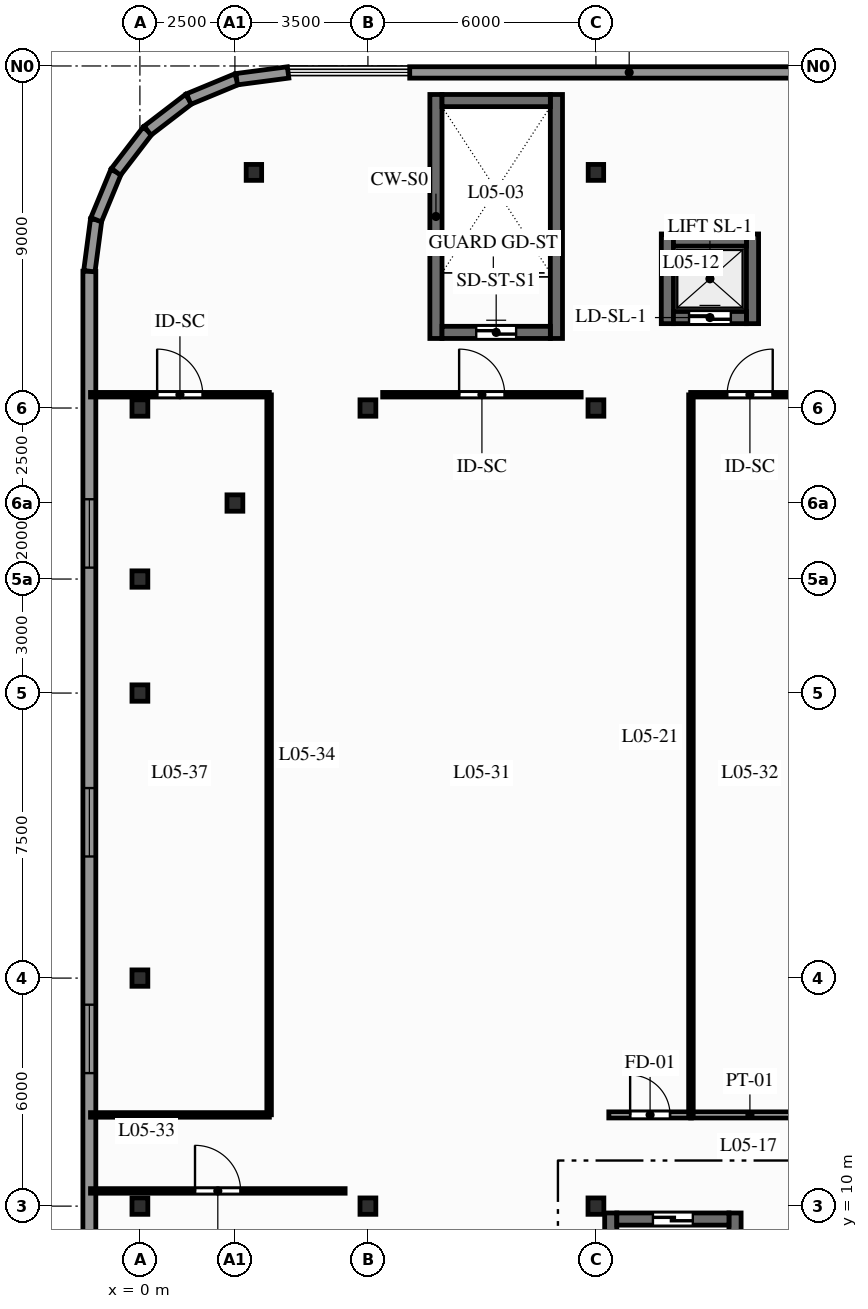
"""IFC4 building model, lengths in metres.
Left out: names, types, materials, properties, quantities, classifications, styles, units other than length and angle.
Written with IfcOpenShell. Run it as: python <this file> out.ifc"""

import sys

from ifc_helpers import new_model, si_unit, direction, frame, frame_2d, origin, origin_2d, place, context, subcontext, project, spatial, rectangle, i_section, extrude, element, fill, save


model = new_model("IFC4")
c1 = context("Model", 3, precision=1e-05, world=origin(), true_north=direction((0.0, 1.0)))
c2 = subcontext(c1, "Body", "Model", "MODEL_VIEW")
j1 = project(units=[si_unit("LENGTHUNIT", "METRE"), si_unit("PLANEANGLEUNIT", "RADIAN")], contexts=[c1])
p1 = place(None, origin())
s1 = spatial("IfcSite", under=j1, at=p1, CompositionType="ELEMENT")
p2 = place(p1, origin())
s2 = spatial("IfcBuilding", under=s1, at=p2, CompositionType="ELEMENT")
p3 = place(p2, frame((0.0, 0.0, 22.5)))
s3 = spatial("IfcBuildingStorey", under=s2, at=p3, CompositionType="ELEMENT", Elevation=22.5)
for number, where, z_axis, x_axis in (
    (1, (0.0, 10.0, 0.0), (0.0, 0.0, 1.0), (1.0, 0.0, 0.0)),
    (2, (0.0, 16.0, 0.0), (0.0, 0.0, 1.0), (1.0, 0.0, 0.0)),
    (3, (0.0, 23.5, 0.0), (0.0, 0.0, 1.0), (1.0, 0.0, 0.0)),
    (4, (0.0, 26.5, 0.0), (0.0, 0.0, 1.0), (1.0, 0.0, 0.0)),
    (5, (0.0, 31.0, 0.0), (0.0, 0.0, 1.0), (1.0, 0.0, 0.0)),
    (6, (2.5, 28.5, 0.0), (0.0, 0.0, 1.0), (1.0, 0.0, 0.0)),
):
    element("IfcColumn", number, at=place(p3, frame(where, z_axis=z_axis, x_axis=x_axis)), inside=s3, PredefinedType="COLUMN", context=c2, shape_type="SweptSolid", body=[
        extrude(i_section(OverallWidth=0.417, OverallDepth=0.431, WebThickness=0.065, FlangeThickness=0.106, FilletRadius=0.015, at=origin_2d()), origin(), (0.0, 0.0, 1.0), 5.5),
    ])
p4 = place(p3, frame((3.0, 37.2, 0.0), z_axis=(0.0, 0.0, 1.0), x_axis=(1.0, 0.0, 0.0)))
e7 = element("IfcColumn", 7, at=p4, inside=s3, PredefinedType="COLUMN", context=c2, shape_type="SweptSolid", body=[
    extrude(i_section(OverallWidth=0.407, OverallDepth=0.419, WebThickness=0.031, FlangeThickness=0.049, FilletRadius=0.015, at=origin_2d()), origin(), (0.0, 0.0, 1.0), 5.5),
])
for number, where, z_axis, x_axis in (
    (8, (6.0, 10.0, 0.0), (0.0, 0.0, 1.0), (1.0, 0.0, 0.0)),
    (9, (6.0, 31.0, 0.0), (0.0, 0.0, 1.0), (1.0, 0.0, 0.0)),
    (10, (12.0, 10.0, 0.0), (0.0, 0.0, 1.0), (1.0, 0.0, 0.0)),
    (11, (12.0, 31.0, 0.0), (0.0, 0.0, 1.0), (1.0, 0.0, 0.0)),
):
    element("IfcColumn", number, at=place(p3, frame(where, z_axis=z_axis, x_axis=x_axis)), inside=s3, PredefinedType="COLUMN", context=c2, shape_type="SweptSolid", body=[
        extrude(i_section(OverallWidth=0.417, OverallDepth=0.431, WebThickness=0.065, FlangeThickness=0.106, FilletRadius=0.015, at=origin_2d()), origin(), (0.0, 0.0, 1.0), 5.5),
    ])
p5 = place(p3, frame((12.0, 37.2, 0.0), z_axis=(0.0, 0.0, 1.0), x_axis=(1.0, 0.0, 0.0)))
e12 = element("IfcColumn", 12, at=p5, inside=s3, PredefinedType="COLUMN", context=c2, shape_type="SweptSolid", body=[
    extrude(i_section(OverallWidth=0.407, OverallDepth=0.419, WebThickness=0.031, FlangeThickness=0.049, FilletRadius=0.015, at=origin_2d()), origin(), (0.0, 0.0, 1.0), 5.5),
])
p6 = place(p3, frame((-1.33, 34.6, 0.0), z_axis=(0.0, 0.0, 1.0), x_axis=(0.0, -1.0, 0.0)))
e13 = element("IfcWall", 13, at=p6, inside=s3, PredefinedType="STANDARD", context=c2, shape_type="SweptSolid", body=[
    extrude(rectangle(XDim=36.43, YDim=0.34, at=frame_2d((18.215, 0.0))), origin(), (0.0, 0.0, 1.0), 5.23),
])
p7 = place(p6, frame((28.3, 0.0, 0.9)))
e14 = element("IfcOpeningElement", 14, at=p7, cuts=e13, PredefinedType="OPENING", context=c2, shape_type="SweptSolid", body=[
    extrude(rectangle(XDim=1.8, YDim=1.95, at=frame_2d((0.9, 0.975))), frame((0.0, 0.18, 0.0), z_axis=(0.0, -1.0, 0.0), x_axis=(1.0, 0.0, 0.0)), (0.0, 0.0, 1.0), 0.36),
])
p8 = place(p6, frame((19.3, 0.0, 0.9)))
e15 = element("IfcOpeningElement", 15, at=p8, cuts=e13, PredefinedType="OPENING", context=c2, shape_type="SweptSolid", body=[
    extrude(rectangle(XDim=1.8, YDim=1.95, at=frame_2d((0.9, 0.975))), frame((0.0, 0.18, 0.0), z_axis=(0.0, -1.0, 0.0), x_axis=(1.0, 0.0, 0.0)), (0.0, 0.0, 1.0), 0.36),
])
p9 = place(p6, frame((13.6, 0.0, 0.9)))
e16 = element("IfcOpeningElement", 16, at=p9, cuts=e13, PredefinedType="OPENING", context=c2, shape_type="SweptSolid", body=[
    extrude(rectangle(XDim=1.8, YDim=1.95, at=frame_2d((0.9, 0.975))), frame((0.0, 0.18, 0.0), z_axis=(0.0, -1.0, 0.0), x_axis=(1.0, 0.0, 0.0)), (0.0, 0.0, 1.0), 0.36),
])
p10 = place(p6, frame((6.0, 0.0, 0.9)))
e17 = element("IfcOpeningElement", 17, at=p10, cuts=e13, PredefinedType="OPENING", context=c2, shape_type="SweptSolid", body=[
    extrude(rectangle(XDim=1.8, YDim=1.95, at=frame_2d((0.9, 0.975))), frame((0.0, 0.18, 0.0), z_axis=(0.0, -1.0, 0.0), x_axis=(1.0, 0.0, 0.0)), (0.0, 0.0, 1.0), 0.36),
])
p11 = place(p3, frame((-1.33, 34.6, 0.0), z_axis=(0.0, 0.0, 1.0), x_axis=(0.13054703207, 0.991442117533, 0.0)))
e18 = element("IfcWall", 18, at=p11, inside=s3, PredefinedType="STANDARD", context=c2, shape_type="SweptSolid", body=[
    extrude(rectangle(XDim=1.365, YDim=0.3, at=frame_2d((0.683, 0.0))), origin(), (0.0, 0.0, 1.0), 5.23),
])
p12 = place(p3, frame((-1.152, 35.954, 0.0), z_axis=(0.0, 0.0, 1.0), x_axis=(0.382646577594, 0.923894797396, 0.0)))
e19 = element("IfcWall", 19, at=p12, inside=s3, PredefinedType="STANDARD", context=c2, shape_type="SweptSolid", body=[
    extrude(rectangle(XDim=1.365, YDim=0.3, at=frame_2d((0.683, 0.0))), origin(), (0.0, 0.0, 1.0), 5.23),
])
for number, where, z_axis, x_axis in (
    (20, (-0.629, 37.215, 0.0), (0.0, 0.0, 1.0), (0.609, 0.793, 0.0)),
    (21, (0.202, 38.298, 0.0), (0.0, 0.0, 1.0), (0.793, 0.609, 0.0)),
):
    element("IfcWall", number, at=place(p3, frame(where, z_axis=z_axis, x_axis=x_axis)), inside=s3, PredefinedType="STANDARD", context=c2, shape_type="SweptSolid", body=[
        extrude(rectangle(XDim=1.365, YDim=0.3, at=frame_2d((0.683, 0.0))), origin(), (0.0, 0.0, 1.0), 5.23),
    ])
p13 = place(p3, frame((1.285, 39.129, 0.0), z_axis=(0.0, 0.0, 1.0), x_axis=(0.923894797396, 0.382646577594, 0.0)))
e22 = element("IfcWall", 22, at=p13, inside=s3, PredefinedType="STANDARD", context=c2, shape_type="SweptSolid", body=[
    extrude(rectangle(XDim=1.365, YDim=0.3, at=frame_2d((0.683, 0.0))), origin(), (0.0, 0.0, 1.0), 5.23),
])
p14 = place(p3, frame((2.546, 39.652, 0.0), z_axis=(0.0, 0.0, 1.0), x_axis=(0.991442117533, 0.13054703207, 0.0)))
e23 = element("IfcWall", 23, at=p14, inside=s3, PredefinedType="STANDARD", context=c2, shape_type="SweptSolid", body=[
    extrude(rectangle(XDim=1.365, YDim=0.3, at=frame_2d((0.683, 0.0))), origin(), (0.0, 0.0, 1.0), 5.23),
])
p15 = place(p3, frame((7.1, 39.83, 0.0), z_axis=(0.0, 0.0, 1.0), x_axis=(1.0, 0.0, 0.0)))
e24 = element("IfcWall", 24, at=p15, inside=s3, PredefinedType="STANDARD", context=c2, shape_type="SweptSolid", body=[
    extrude(rectangle(XDim=11.55, YDim=0.3, at=frame_2d((5.775, 0.0))), origin(), (0.0, 0.0, 1.0), 5.23),
])
for number, where, z_axis, x_axis in (
    (25, (12.39, 2.46, 0.0), (0.0, 0.0, 1.0), (0.0, 1.0, 0.0)),
    (26, (15.66, 2.46, 0.0), (0.0, 0.0, 1.0), (0.0, 1.0, 0.0)),
):
    element("IfcWall", number, at=place(p3, frame(where, z_axis=z_axis, x_axis=x_axis)), inside=s3, PredefinedType="SHEAR", context=c2, shape_type="SweptSolid", body=[
        extrude(rectangle(XDim=7.36, YDim=0.32, at=frame_2d((3.68, 0.0))), origin(), (0.0, 0.0, 1.0), 5.23),
    ])
p16 = place(p3, frame((15.5, 9.66, 0.0), z_axis=(0.0, 0.0, 1.0), x_axis=(-1.0, 0.0, 0.0)))
e27 = element("IfcWall", 27, at=p16, inside=s3, PredefinedType="SHEAR", context=c2, shape_type="SweptSolid", body=[
    extrude(rectangle(XDim=2.95, YDim=0.32, at=frame_2d((1.475, 0.0))), origin(), (0.0, 0.0, 1.0), 5.23),
])
p17 = place(p16, frame((0.95, 0.0, 0.0)))
e28 = element("IfcOpeningElement", 28, at=p17, cuts=e27, PredefinedType="OPENING", context=c2, shape_type="SweptSolid", body=[
    extrude(rectangle(XDim=1.05, YDim=2.06, at=frame_2d((0.525, 1.03))), frame((0.0, 0.17, 0.0), z_axis=(0.0, -1.0, 0.0), x_axis=(1.0, 0.0, 0.0)), (0.0, 0.0, 1.0), 0.34),
])
for number, where, z_axis, x_axis in (
    (29, (7.79, 32.83, 0.0), (0.0, 0.0, 1.0), (0.0, 1.0, 0.0)),
    (30, (10.96, 32.83, 0.0), (0.0, 0.0, 1.0), (0.0, 1.0, 0.0)),
):
    element("IfcWall", number, at=place(p3, frame(where, z_axis=z_axis, x_axis=x_axis)), inside=s3, PredefinedType="SHEAR", context=c2, shape_type="SweptSolid", body=[
        extrude(rectangle(XDim=6.42, YDim=0.32, at=frame_2d((3.21, 0.0))), origin(), (0.0, 0.0, 1.0), 5.23),
    ])
p18 = place(p3, frame((7.95, 32.99, 0.0), z_axis=(0.0, 0.0, 1.0), x_axis=(1.0, 0.0, 0.0)))
e31 = element("IfcWall", 31, at=p18, inside=s3, PredefinedType="SHEAR", context=c2, shape_type="SweptSolid", body=[
    extrude(rectangle(XDim=2.85, YDim=0.32, at=frame_2d((1.425, 0.0))), origin(), (0.0, 0.0, 1.0), 5.23),
])
p19 = place(p18, frame((0.9, 0.0, 0.0)))
e32 = element("IfcOpeningElement", 32, at=p19, cuts=e31, PredefinedType="OPENING", context=c2, shape_type="SweptSolid", body=[
    extrude(rectangle(XDim=1.05, YDim=2.06, at=frame_2d((0.525, 1.03))), frame((0.0, 0.17, 0.0), z_axis=(0.0, -1.0, 0.0), x_axis=(1.0, 0.0, 0.0)), (0.0, 0.0, 1.0), 0.34),
])
p20 = place(p3, frame((10.8, 39.09, 0.0), z_axis=(0.0, 0.0, 1.0), x_axis=(-1.0, 0.0, 0.0)))
e33 = element("IfcWall", 33, at=p20, inside=s3, PredefinedType="SHEAR", context=c2, shape_type="SweptSolid", body=[
    extrude(rectangle(XDim=2.85, YDim=0.32, at=frame_2d((1.425, 0.0))), origin(), (0.0, 0.0, 1.0), 5.23),
])
for number, where, z_axis, x_axis in (
    (34, (13.88, 33.22, 0.0), (0.0, 0.0, 1.0), (0.0, 1.0, 0.0)),
    (35, (16.12, 33.22, 0.0), (0.0, 0.0, 1.0), (0.0, 1.0, 0.0)),
):
    element("IfcWall", number, at=place(p3, frame(where, z_axis=z_axis, x_axis=x_axis)), inside=s3, PredefinedType="SHEAR", context=c2, shape_type="SweptSolid", body=[
        extrude(rectangle(XDim=2.36, YDim=0.32, at=frame_2d((1.18, 0.0))), origin(), (0.0, 0.0, 1.0), 5.23),
    ])
p21 = place(p3, frame((14.04, 33.38, 0.0), z_axis=(0.0, 0.0, 1.0), x_axis=(1.0, 0.0, 0.0)))
e36 = element("IfcWall", 36, at=p21, inside=s3, PredefinedType="SHEAR", context=c2, shape_type="SweptSolid", body=[
    extrude(rectangle(XDim=1.92, YDim=0.32, at=frame_2d((0.96, 0.0))), origin(), (0.0, 0.0, 1.0), 5.23),
])
p22 = place(p21, frame((0.41, 0.0, 0.0)))
e37 = element("IfcOpeningElement", 37, at=p22, cuts=e36, PredefinedType="OPENING", context=c2, shape_type="SweptSolid", body=[
    extrude(rectangle(XDim=1.1, YDim=2.06, at=frame_2d((0.55, 1.03))), frame((0.0, 0.17, 0.0), z_axis=(0.0, -1.0, 0.0), x_axis=(1.0, 0.0, 0.0)), (0.0, 0.0, 1.0), 0.34),
])
p23 = place(p3, frame((14.04, 35.42, 0.0), z_axis=(0.0, 0.0, 1.0), x_axis=(1.0, 0.0, 0.0)))
e38 = element("IfcWall", 38, at=p23, inside=s3, PredefinedType="SHEAR", context=c2, shape_type="SweptSolid", body=[
    extrude(rectangle(XDim=1.92, YDim=0.32, at=frame_2d((0.96, 0.0))), origin(), (0.0, 0.0, 1.0), 5.23),
])
p24 = place(p3, frame((12.339, 12.4, 0.0), z_axis=(0.0, 0.0, 1.0), x_axis=(1.0, 0.0, 0.0)))
e39 = element("IfcWall", 39, at=p24, inside=s3, PredefinedType="PARTITIONING", context=c2, shape_type="SweptSolid", body=[
    extrude(rectangle(XDim=2.173, YDim=0.16, at=frame_2d((1.086, 0.0))), origin(), (0.0, 0.0, 1.0), 5.23),
])
p25 = place(p24, frame((0.561, 0.0, 0.0)))
e40 = element("IfcOpeningElement", 40, at=p25, cuts=e39, PredefinedType="OPENING", context=c2, shape_type="SweptSolid", body=[
    extrude(rectangle(XDim=1.05, YDim=2.06, at=frame_2d((0.525, 1.03))), frame((0.0, 0.09, 0.0), z_axis=(0.0, -1.0, 0.0), x_axis=(1.0, 0.0, 0.0)), (0.0, 0.0, 1.0), 0.18),
])
p26 = place(p3, frame((14.493, 12.4, 0.0), z_axis=(0.0, 0.0, 1.0), x_axis=(1.0, 0.0, 0.0)))
e41 = element("IfcWall", 41, at=p26, inside=s3, PredefinedType="PARTITIONING", context=c2, shape_type="SweptSolid", body=[
    extrude(rectangle(XDim=3.119, YDim=0.16, at=frame_2d((1.559, 0.0))), origin(), (0.0, 0.0, 1.0), 5.23),
])
p27 = place(p3, frame((6.389, 31.35, 0.0), z_axis=(0.0, 0.0, 1.0), x_axis=(1.0, 0.0, 0.0)))
e42 = element("IfcWall", 42, at=p27, inside=s3, PredefinedType="PARTITIONING", context=c2, shape_type="SweptSolid", body=[
    extrude(rectangle(XDim=5.223, YDim=0.12, at=frame_2d((2.611, 0.0))), origin(), (0.0, 0.0, 1.0), 5.23),
])
p28 = place(p27, frame((2.011, 0.0, 0.0)))
e43 = element("IfcOpeningElement", 43, at=p28, cuts=e42, PredefinedType="OPENING", context=c2, shape_type="SweptSolid", body=[
    extrude(rectangle(XDim=1.2, YDim=2.08, at=frame_2d((0.6, 1.04))), frame((0.0, 0.07, 0.0), z_axis=(0.0, -1.0, 0.0), x_axis=(1.0, 0.0, 0.0)), (0.0, 0.0, 1.0), 0.14),
])
p29 = place(p3, frame((14.493, 31.35, 0.0), z_axis=(0.0, 0.0, 1.0), x_axis=(1.0, 0.0, 0.0)))
e44 = element("IfcWall", 44, at=p29, inside=s3, PredefinedType="PARTITIONING", context=c2, shape_type="SweptSolid", body=[
    extrude(rectangle(XDim=3.119, YDim=0.12, at=frame_2d((1.559, 0.0))), origin(), (0.0, 0.0, 1.0), 5.23),
])
p30 = place(p29, frame((0.959, 0.0, 0.0)))
e45 = element("IfcOpeningElement", 45, at=p30, cuts=e44, PredefinedType="OPENING", context=c2, shape_type="SweptSolid", body=[
    extrude(rectangle(XDim=1.2, YDim=2.08, at=frame_2d((0.6, 1.04))), frame((0.0, 0.07, 0.0), z_axis=(0.0, -1.0, 0.0), x_axis=(1.0, 0.0, 0.0)), (0.0, 0.0, 1.0), 0.14),
])
p31 = place(p3, frame((-1.3, 31.35, 0.0), z_axis=(0.0, 0.0, 1.0), x_axis=(1.0, 0.0, 0.0)))
e46 = element("IfcWall", 46, at=p31, inside=s3, PredefinedType="PARTITIONING", context=c2, shape_type="SweptSolid", body=[
    extrude(rectangle(XDim=4.707, YDim=0.12, at=frame_2d((2.354, 0.0))), origin(), (0.0, 0.0, 1.0), 5.23),
])
p32 = place(p31, frame((1.754, 0.0, 0.0)))
e47 = element("IfcOpeningElement", 47, at=p32, cuts=e46, PredefinedType="OPENING", context=c2, shape_type="SweptSolid", body=[
    extrude(rectangle(XDim=1.2, YDim=2.08, at=frame_2d((0.6, 1.04))), frame((0.0, 0.07, 0.0), z_axis=(0.0, -1.0, 0.0), x_axis=(1.0, 0.0, 0.0)), (0.0, 0.0, 1.0), 0.14),
])
p33 = place(p3, frame((14.5, 12.404, 0.0), z_axis=(0.0, 0.0, 1.0), x_axis=(0.0, 1.0, 0.0)))
e48 = element("IfcWall", 48, at=p33, inside=s3, PredefinedType="PARTITIONING", context=c2, shape_type="SweptSolid", body=[
    extrude(rectangle(XDim=18.942, YDim=0.12, at=frame_2d((9.471, 0.0))), origin(), (0.0, 0.0, 1.0), 4.585),
])
p34 = place(p3, frame((-1.3, 12.4, 0.0), z_axis=(0.0, 0.0, 1.0), x_axis=(1.0, 0.0, 0.0)))
e49 = element("IfcWall", 49, at=p34, inside=s3, PredefinedType="PARTITIONING", context=c2, shape_type="SweptSolid", body=[
    extrude(rectangle(XDim=4.707, YDim=0.12, at=frame_2d((2.354, 0.0))), origin(), (0.0, 0.0, 1.0), 4.666),
])
p35 = place(p3, frame((-1.3, 10.4, 0.0), z_axis=(0.0, 0.0, 1.0), x_axis=(1.0, 0.0, 0.0)))
e50 = element("IfcWall", 50, at=p35, inside=s3, PredefinedType="PARTITIONING", context=c2, shape_type="SweptSolid", body=[
    extrude(rectangle(XDim=6.7, YDim=0.12, at=frame_2d((3.35, 0.0))), origin(), (0.0, 0.0, 1.0), 4.666),
])
p36 = place(p35, frame((2.75, 0.0, 0.0)))
e51 = element("IfcOpeningElement", 51, at=p36, cuts=e50, PredefinedType="OPENING", context=c2, shape_type="SweptSolid", body=[
    extrude(rectangle(XDim=1.2, YDim=2.08, at=frame_2d((0.6, 1.04))), frame((0.0, 0.07, 0.0), z_axis=(0.0, -1.0, 0.0), x_axis=(1.0, 0.0, 0.0)), (0.0, 0.0, 1.0), 0.14),
])
p37 = place(p3, frame((3.4, 12.404, 0.0), z_axis=(0.0, 0.0, 1.0), x_axis=(0.0, 1.0, 0.0)))
e52 = element("IfcWall", 52, at=p37, inside=s3, PredefinedType="PARTITIONING", context=c2, shape_type="SweptSolid", body=[
    extrude(rectangle(XDim=18.942, YDim=0.12, at=frame_2d((9.471, 0.0))), origin(), (0.0, 0.0, 1.0), 4.585),
])
p38 = place(p8, origin())
e53 = element("IfcWindow", 53, at=p38, inside=s3, PartitioningType="SINGLE_PANEL", PredefinedType="WINDOW", context=c2, shape_type="SweptSolid", body=[
    extrude(rectangle(XDim=1.8, YDim=1.95, at=frame_2d((0.9, 0.975))), frame((0.0, 0.03, 0.0), z_axis=(0.0, -1.0, 0.0), x_axis=(1.0, 0.0, 0.0)), (0.0, 0.0, 1.0), 0.06),
])
fill(e15, e53)
p39 = place(p9, origin())
e54 = element("IfcWindow", 54, at=p39, inside=s3, PartitioningType="SINGLE_PANEL", PredefinedType="WINDOW", context=c2, shape_type="SweptSolid", body=[
    extrude(rectangle(XDim=1.8, YDim=1.95, at=frame_2d((0.9, 0.975))), frame((0.0, 0.03, 0.0), z_axis=(0.0, -1.0, 0.0), x_axis=(1.0, 0.0, 0.0)), (0.0, 0.0, 1.0), 0.06),
])
fill(e16, e54)
p40 = place(p10, origin())
e55 = element("IfcWindow", 55, at=p40, inside=s3, PartitioningType="SINGLE_PANEL", PredefinedType="WINDOW", context=c2, shape_type="SweptSolid", body=[
    extrude(rectangle(XDim=1.8, YDim=1.95, at=frame_2d((0.9, 0.975))), frame((0.0, 0.03, 0.0), z_axis=(0.0, -1.0, 0.0), x_axis=(1.0, 0.0, 0.0)), (0.0, 0.0, 1.0), 0.06),
])
fill(e17, e55)
p41 = place(p17, origin())
e56 = element("IfcDoor", 56, at=p41, inside=s3, OperationType="SINGLE_SWING_LEFT", PredefinedType="DOOR", context=c2, shape_type="SweptSolid", body=[
    extrude(rectangle(XDim=1.05, YDim=2.06, at=frame_2d((0.525, 1.03))), frame((0.0, 0.025, 0.0), z_axis=(0.0, -1.0, 0.0), x_axis=(1.0, 0.0, 0.0)), (0.0, 0.0, 1.0), 0.05),
])
fill(e28, e56)
p42 = place(p19, origin())
e57 = element("IfcDoor", 57, at=p42, inside=s3, OperationType="SINGLE_SWING_RIGHT", PredefinedType="DOOR", context=c2, shape_type="SweptSolid", body=[
    extrude(rectangle(XDim=1.05, YDim=2.06, at=frame_2d((0.525, 1.03))), frame((0.0, 0.025, 0.0), z_axis=(0.0, -1.0, 0.0), x_axis=(1.0, 0.0, 0.0)), (0.0, 0.0, 1.0), 0.05),
])
fill(e32, e57)
p43 = place(p22, origin())
e58 = element("IfcDoor", 58, at=p43, inside=s3, OperationType="SLIDING_TO_LEFT", PredefinedType="DOOR", context=c2, shape_type="SweptSolid", body=[
    extrude(rectangle(XDim=1.1, YDim=2.06, at=frame_2d((0.55, 1.03))), frame((0.0, 0.025, 0.0), z_axis=(0.0, -1.0, 0.0), x_axis=(1.0, 0.0, 0.0)), (0.0, 0.0, 1.0), 0.05),
])
fill(e37, e58)
p44 = place(p25, origin())
e59 = element("IfcDoor", 59, at=p44, inside=s3, OperationType="SINGLE_SWING_LEFT", PredefinedType="DOOR", context=c2, shape_type="SweptSolid", body=[
    extrude(rectangle(XDim=1.05, YDim=2.06, at=frame_2d((0.525, 1.03))), frame((0.0, 0.025, 0.0), z_axis=(0.0, -1.0, 0.0), x_axis=(1.0, 0.0, 0.0)), (0.0, 0.0, 1.0), 0.05),
])
fill(e40, e59)
p45 = place(p28, origin())
e60 = element("IfcDoor", 60, at=p45, inside=s3, OperationType="SINGLE_SWING_LEFT", PredefinedType="DOOR", context=c2, shape_type="SweptSolid", body=[
    extrude(rectangle(XDim=1.2, YDim=2.08, at=frame_2d((0.6, 1.04))), frame((0.0, 0.025, 0.0), z_axis=(0.0, -1.0, 0.0), x_axis=(1.0, 0.0, 0.0)), (0.0, 0.0, 1.0), 0.05),
])
fill(e43, e60)
p46 = place(p30, origin())
e61 = element("IfcDoor", 61, at=p46, inside=s3, OperationType="SINGLE_SWING_RIGHT", PredefinedType="DOOR", context=c2, shape_type="SweptSolid", body=[
    extrude(rectangle(XDim=1.2, YDim=2.08, at=frame_2d((0.6, 1.04))), frame((0.0, 0.025, 0.0), z_axis=(0.0, -1.0, 0.0), x_axis=(1.0, 0.0, 0.0)), (0.0, 0.0, 1.0), 0.05),
])
fill(e45, e61)
p47 = place(p32, origin())
e62 = element("IfcDoor", 62, at=p47, inside=s3, OperationType="SINGLE_SWING_LEFT", PredefinedType="DOOR", context=c2, shape_type="SweptSolid", body=[
    extrude(rectangle(XDim=1.2, YDim=2.08, at=frame_2d((0.6, 1.04))), frame((0.0, 0.025, 0.0), z_axis=(0.0, -1.0, 0.0), x_axis=(1.0, 0.0, 0.0)), (0.0, 0.0, 1.0), 0.05),
])
fill(e47, e62)
p48 = place(p36, origin())
e63 = element("IfcDoor", 63, at=p48, inside=s3, OperationType="SINGLE_SWING_LEFT", PredefinedType="DOOR", context=c2, shape_type="SweptSolid", body=[
    extrude(rectangle(XDim=1.2, YDim=2.08, at=frame_2d((0.6, 1.04))), frame((0.0, 0.025, 0.0), z_axis=(0.0, -1.0, 0.0), x_axis=(1.0, 0.0, 0.0)), (0.0, 0.0, 1.0), 0.05),
])
fill(e51, e63)
save(model, sys.argv[1])
